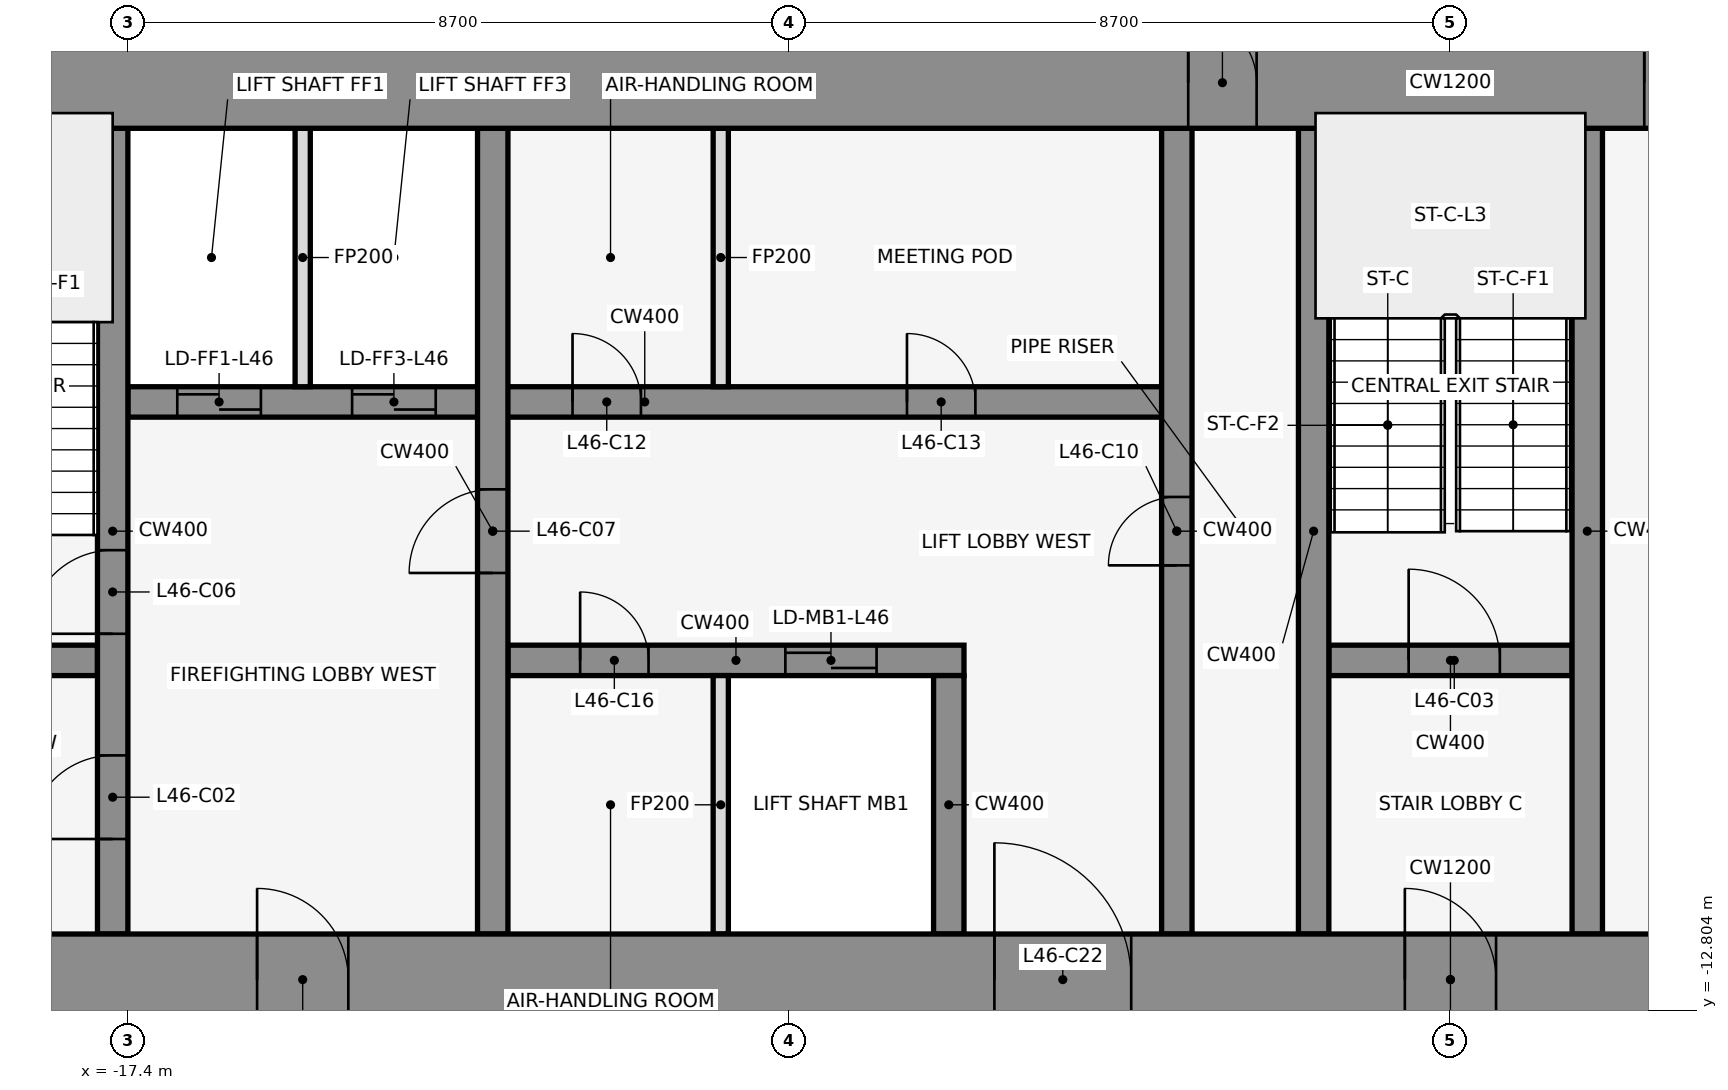
"""IFC4 building model, lengths in metres.
Left out: names, types, materials, properties, quantities, classifications, styles, units other than length and angle.
Written with IfcOpenShell. Run it as: python <this file> out.ifc"""

import sys

from ifc_helpers import new_model, si_unit, direction, frame, frame_2d, origin, place, context, subcontext, project, spatial, rectangle, extrude, element, fill, save


model = new_model("IFC4")
c1 = context("Model", 3, precision=1e-05, world=origin(), true_north=direction((0.0, 1.0)))
c2 = subcontext(c1, "Body", "Model", "MODEL_VIEW")
j1 = project(units=[si_unit("LENGTHUNIT", "METRE"), si_unit("PLANEANGLEUNIT", "RADIAN")], contexts=[c1])
p1 = place(None, origin())
s1 = spatial("IfcSite", under=j1, at=p1, CompositionType="ELEMENT")
p2 = place(p1, origin())
s2 = spatial("IfcBuilding", under=s1, at=p2, CompositionType="ELEMENT")
p3 = place(p2, frame((0.0, 0.0, 207.3)))
s3 = spatial("IfcBuildingStorey", under=s2, at=p3, CompositionType="ELEMENT", Elevation=207.3)
for number, where, z_axis, x_axis in (
    (1, (1.901, 1.08, 0.0), (0.0, 0.0, 1.0), (-0.84, -0.543, 0.0)),
    (2, (-0.068, -0.105, 0.0), (0.0, 0.0, 1.0), (-0.84, 0.543, 0.0)),
    (3, (-14.599, 1.08, 0.0), (0.0, 0.0, 1.0), (-0.84, -0.543, 0.0)),
):
    element("IfcWall", number, at=place(p3, frame(where, z_axis=z_axis, x_axis=x_axis)), inside=s3, PredefinedType="STANDARD", context=c2, shape_type="SweptSolid", body=[
        extrude(rectangle(XDim=2.183, YDim=0.25, at=frame_2d((1.091, 0.0))), origin(), (0.0, 0.0, 1.0), 3.95),
    ])
p4 = place(p3, frame((-20.8, -8.2, 0.0), z_axis=(0.0, 0.0, 1.0), x_axis=(1.0, 0.0, 0.0)))
e4 = element("IfcWall", 4, at=p4, inside=s3, PredefinedType="SHEAR", context=c2, shape_type="SweptSolid", body=[
    extrude(rectangle(XDim=3.0, YDim=0.4, at=frame_2d((1.5, 0.0))), origin(), (0.0, 0.0, 1.0), 4.1),
])
p5 = place(p4, frame((0.85, 0.0, 0.0)))
e5 = element("IfcOpeningElement", 5, at=p5, cuts=e4, PredefinedType="OPENING", context=c2, shape_type="SweptSolid", body=[
    extrude(rectangle(XDim=1.2, YDim=2.1, at=frame_2d((0.6, 1.05))), frame((0.0, 0.212, 0.0), z_axis=(0.0, -1.0, 0.0), x_axis=(1.0, 0.0, 0.0)), (0.0, 0.0, 1.0), 0.424),
])
p6 = place(p3, frame((-12.4, -8.2, 0.0), z_axis=(0.0, 0.0, 1.0), x_axis=(1.0, 0.0, 0.0)))
e6 = element("IfcWall", 6, at=p6, inside=s3, PredefinedType="SHEAR", context=c2, shape_type="SweptSolid", body=[
    extrude(rectangle(XDim=6.0, YDim=0.4, at=frame_2d((3.0, 0.0))), origin(), (0.0, 0.0, 1.0), 4.1),
])
p7 = place(p6, frame((3.65, 0.0, 0.0)))
e7 = element("IfcOpeningElement", 7, at=p7, cuts=e6, PredefinedType="OPENING", context=c2, shape_type="SweptSolid", body=[
    extrude(rectangle(XDim=1.2, YDim=2.1, at=frame_2d((0.6, 1.05))), frame((0.0, 0.212, 0.0), z_axis=(0.0, -1.0, 0.0), x_axis=(1.0, 0.0, 0.0)), (0.0, 0.0, 1.0), 0.424),
])
p8 = place(p6, frame((0.95, 0.0, 0.0)))
e8 = element("IfcOpeningElement", 8, at=p8, cuts=e6, PredefinedType="OPENING", context=c2, shape_type="SweptSolid", body=[
    extrude(rectangle(XDim=0.9, YDim=2.1, at=frame_2d((0.45, 1.05))), frame((0.0, 0.212, 0.0), z_axis=(0.0, -1.0, 0.0), x_axis=(1.0, 0.0, 0.0)), (0.0, 0.0, 1.0), 0.424),
])
p9 = place(p3, frame((-1.6, -8.2, 0.0), z_axis=(0.0, 0.0, 1.0), x_axis=(1.0, 0.0, 0.0)))
e9 = element("IfcWall", 9, at=p9, inside=s3, PredefinedType="SHEAR", context=c2, shape_type="SweptSolid", body=[
    extrude(rectangle(XDim=3.2, YDim=0.4, at=frame_2d((1.6, 0.0))), origin(), (0.0, 0.0, 1.0), 4.1),
])
p10 = place(p9, frame((1.05, 0.0, 0.0)))
e10 = element("IfcOpeningElement", 10, at=p10, cuts=e9, PredefinedType="OPENING", context=c2, shape_type="SweptSolid", body=[
    extrude(rectangle(XDim=1.2, YDim=2.1, at=frame_2d((0.6, 1.05))), frame((0.0, 0.212, 0.0), z_axis=(0.0, -1.0, 0.0), x_axis=(1.0, 0.0, 0.0)), (0.0, 0.0, 1.0), 0.424),
])
p11 = place(p3, frame((-17.4, -4.8, 0.0), z_axis=(0.0, 0.0, 1.0), x_axis=(1.0, 0.0, 0.0)))
e11 = element("IfcWall", 11, at=p11, inside=s3, PredefinedType="SHEAR", context=c2, shape_type="SweptSolid", body=[
    extrude(rectangle(XDim=13.6, YDim=0.4, at=frame_2d((6.8, 0.0))), origin(), (0.0, 0.0, 1.0), 4.1),
])
p12 = place(p11, frame((0.65, 0.0, 0.0)))
e12 = element("IfcOpeningElement", 12, at=p12, cuts=e11, PredefinedType="OPENING", context=c2, shape_type="SweptSolid", body=[
    extrude(rectangle(XDim=1.1, YDim=2.1, at=frame_2d((0.55, 1.05))), frame((0.0, 0.212, 0.0), z_axis=(0.0, -1.0, 0.0), x_axis=(1.0, 0.0, 0.0)), (0.0, 0.0, 1.0), 0.424),
])
p13 = place(p11, frame((2.95, 0.0, 0.0)))
e13 = element("IfcOpeningElement", 13, at=p13, cuts=e11, PredefinedType="OPENING", context=c2, shape_type="SweptSolid", body=[
    extrude(rectangle(XDim=1.1, YDim=2.1, at=frame_2d((0.55, 1.05))), frame((0.0, 0.212, 0.0), z_axis=(0.0, -1.0, 0.0), x_axis=(1.0, 0.0, 0.0)), (0.0, 0.0, 1.0), 0.424),
])
p14 = place(p11, frame((5.85, 0.0, 0.0)))
e14 = element("IfcOpeningElement", 14, at=p14, cuts=e11, PredefinedType="OPENING", context=c2, shape_type="SweptSolid", body=[
    extrude(rectangle(XDim=0.9, YDim=2.1, at=frame_2d((0.45, 1.05))), frame((0.0, 0.212, 0.0), z_axis=(0.0, -1.0, 0.0), x_axis=(1.0, 0.0, 0.0)), (0.0, 0.0, 1.0), 0.424),
])
p15 = place(p11, frame((10.25, 0.0, 0.0)))
e15 = element("IfcOpeningElement", 15, at=p15, cuts=e11, PredefinedType="OPENING", context=c2, shape_type="SweptSolid", body=[
    extrude(rectangle(XDim=0.9, YDim=2.1, at=frame_2d((0.45, 1.05))), frame((0.0, 0.212, 0.0), z_axis=(0.0, -1.0, 0.0), x_axis=(1.0, 0.0, 0.0)), (0.0, 0.0, 1.0), 0.424),
])
p16 = place(p3, frame((-17.6, -11.8, 0.0), z_axis=(0.0, 0.0, 1.0), x_axis=(0.0, 1.0, 0.0)))
e16 = element("IfcWall", 16, at=p16, inside=s3, PredefinedType="SHEAR", context=c2, shape_type="SweptSolid", body=[
    extrude(rectangle(XDim=10.6, YDim=0.4, at=frame_2d((5.3, 0.0))), origin(), (0.0, 0.0, 1.0), 4.1),
])
p17 = place(p16, frame((1.25, 0.0, 0.0)))
e17 = element("IfcOpeningElement", 17, at=p17, cuts=e16, PredefinedType="OPENING", context=c2, shape_type="SweptSolid", body=[
    extrude(rectangle(XDim=1.1, YDim=2.1, at=frame_2d((0.55, 1.05))), frame((0.0, 0.212, 0.0), z_axis=(0.0, -1.0, 0.0), x_axis=(1.0, 0.0, 0.0)), (0.0, 0.0, 1.0), 0.424),
])
p18 = place(p16, frame((3.95, 0.0, 0.0)))
e18 = element("IfcOpeningElement", 18, at=p18, cuts=e16, PredefinedType="OPENING", context=c2, shape_type="SweptSolid", body=[
    extrude(rectangle(XDim=1.1, YDim=2.1, at=frame_2d((0.55, 1.05))), frame((0.0, 0.212, 0.0), z_axis=(0.0, -1.0, 0.0), x_axis=(1.0, 0.0, 0.0)), (0.0, 0.0, 1.0), 0.424),
])
p19 = place(p3, frame((-15.1, -4.6, 0.0), z_axis=(0.0, 0.0, 1.0), x_axis=(0.0, 1.0, 0.0)))
e19 = element("IfcWall", 19, at=p19, inside=s3, PredefinedType="PARTITIONING", context=c2, shape_type="SweptSolid", body=[
    extrude(rectangle(XDim=3.4, YDim=0.2, at=frame_2d((1.7, 0.0))), origin(), (0.0, 0.0, 1.0), 2.84),
])
p20 = place(p3, frame((-12.6, -11.8, 0.0), z_axis=(0.0, 0.0, 1.0), x_axis=(0.0, 1.0, 0.0)))
e20 = element("IfcWall", 20, at=p20, inside=s3, PredefinedType="SHEAR", context=c2, shape_type="SweptSolid", body=[
    extrude(rectangle(XDim=10.6, YDim=0.4, at=frame_2d((5.3, 0.0))), origin(), (0.0, 0.0, 1.0), 4.1),
])
p21 = place(p20, frame((4.75, 0.0, 0.0)))
e21 = element("IfcOpeningElement", 21, at=p21, cuts=e20, PredefinedType="OPENING", context=c2, shape_type="SweptSolid", body=[
    extrude(rectangle(XDim=1.1, YDim=2.1, at=frame_2d((0.55, 1.05))), frame((0.0, 0.212, 0.0), z_axis=(0.0, -1.0, 0.0), x_axis=(1.0, 0.0, 0.0)), (0.0, 0.0, 1.0), 0.424),
])
for number, where, z_axis, x_axis in (
    (22, (-9.6, -11.8, 0.0), (0.0, 0.0, 1.0), (0.0, 1.0, 0.0)),
    (23, (-9.6, -4.6, 0.0), (0.0, 0.0, 1.0), (0.0, 1.0, 0.0)),
):
    element("IfcWall", number, at=place(p3, frame(where, z_axis=z_axis, x_axis=x_axis)), inside=s3, PredefinedType="PARTITIONING", context=c2, shape_type="SweptSolid", body=[
        extrude(rectangle(XDim=3.4, YDim=0.2, at=frame_2d((1.7, 0.0))), origin(), (0.0, 0.0, 1.0), 2.84),
    ])
p22 = place(p3, frame((-6.6, -11.8, 0.0), z_axis=(0.0, 0.0, 1.0), x_axis=(0.0, 1.0, 0.0)))
e24 = element("IfcWall", 24, at=p22, inside=s3, PredefinedType="SHEAR", context=c2, shape_type="SweptSolid", body=[
    extrude(rectangle(XDim=3.4, YDim=0.4, at=frame_2d((1.7, 0.0))), origin(), (0.0, 0.0, 1.0), 4.1),
])
p23 = place(p3, frame((-3.6, -11.8, 0.0), z_axis=(0.0, 0.0, 1.0), x_axis=(0.0, 1.0, 0.0)))
e25 = element("IfcWall", 25, at=p23, inside=s3, PredefinedType="SHEAR", context=c2, shape_type="SweptSolid", body=[
    extrude(rectangle(XDim=10.6, YDim=0.4, at=frame_2d((5.3, 0.0))), origin(), (0.0, 0.0, 1.0), 4.1),
])
p24 = place(p23, frame((4.85, 0.0, 0.0)))
e26 = element("IfcOpeningElement", 26, at=p24, cuts=e25, PredefinedType="OPENING", context=c2, shape_type="SweptSolid", body=[
    extrude(rectangle(XDim=0.9, YDim=2.1, at=frame_2d((0.45, 1.05))), frame((0.0, 0.212, 0.0), z_axis=(0.0, -1.0, 0.0), x_axis=(1.0, 0.0, 0.0)), (0.0, 0.0, 1.0), 0.424),
])
for number, where, z_axis, x_axis in (
    (27, (-1.8, -11.8, 0.0), (0.0, 0.0, 1.0), (0.0, 1.0, 0.0)),
    (28, (1.8, -11.8, 0.0), (0.0, 0.0, 1.0), (0.0, 1.0, 0.0)),
):
    element("IfcWall", number, at=place(p3, frame(where, z_axis=z_axis, x_axis=x_axis)), inside=s3, PredefinedType="SHEAR", context=c2, shape_type="SweptSolid", body=[
        extrude(rectangle(XDim=10.6, YDim=0.4, at=frame_2d((5.3, 0.0))), origin(), (0.0, 0.0, 1.0), 4.1),
    ])
p25 = place(p3, frame((-22.0, -0.6, 0.0), z_axis=(0.0, 0.0, 1.0), x_axis=(1.0, 0.0, 0.0)))
e29 = element("IfcWall", 29, at=p25, inside=s3, PredefinedType="SHEAR", context=c2, shape_type="SweptSolid", body=[
    extrude(rectangle(XDim=44.0, YDim=1.2, at=frame_2d((22.0, 0.0))), origin(), (0.0, 0.0, 1.0), 4.1),
])
p26 = place(p25, frame((18.55, 0.0, 0.0)))
e30 = element("IfcOpeningElement", 30, at=p26, cuts=e29, PredefinedType="OPENING", context=c2, shape_type="SweptSolid", body=[
    extrude(rectangle(XDim=0.9, YDim=2.1, at=frame_2d((0.45, 1.05))), frame((0.0, 0.612, 0.0), z_axis=(0.0, -1.0, 0.0), x_axis=(1.0, 0.0, 0.0)), (0.0, 0.0, 1.0), 1.224),
])
p27 = place(p25, frame((24.55, 0.0, 0.0)))
e31 = element("IfcOpeningElement", 31, at=p27, cuts=e29, PredefinedType="OPENING", context=c2, shape_type="SweptSolid", body=[
    extrude(rectangle(XDim=0.9, YDim=2.1, at=frame_2d((0.45, 1.05))), frame((0.0, 0.612, 0.0), z_axis=(0.0, -1.0, 0.0), x_axis=(1.0, 0.0, 0.0)), (0.0, 0.0, 1.0), 1.224),
])
p28 = place(p3, frame((-22.0, -12.4, 0.0), z_axis=(0.0, 0.0, 1.0), x_axis=(1.0, 0.0, 0.0)))
e32 = element("IfcWall", 32, at=p28, inside=s3, PredefinedType="SHEAR", context=c2, shape_type="SweptSolid", body=[
    extrude(rectangle(XDim=44.0, YDim=1.2, at=frame_2d((22.0, 0.0))), origin(), (0.0, 0.0, 1.0), 4.1),
])
p29 = place(p28, frame((2.2, 0.0, 0.0)))
e33 = element("IfcOpeningElement", 33, at=p29, cuts=e32, PredefinedType="OPENING", context=c2, shape_type="SweptSolid", body=[
    extrude(rectangle(XDim=1.2, YDim=2.1, at=frame_2d((0.6, 1.05))), frame((0.0, 0.612, 0.0), z_axis=(0.0, -1.0, 0.0), x_axis=(1.0, 0.0, 0.0)), (0.0, 0.0, 1.0), 1.224),
])
p30 = place(p28, frame((21.4, 0.0, 0.0)))
e34 = element("IfcOpeningElement", 34, at=p30, cuts=e32, PredefinedType="OPENING", context=c2, shape_type="SweptSolid", body=[
    extrude(rectangle(XDim=1.2, YDim=2.1, at=frame_2d((0.6, 1.05))), frame((0.0, 0.612, 0.0), z_axis=(0.0, -1.0, 0.0), x_axis=(1.0, 0.0, 0.0)), (0.0, 0.0, 1.0), 1.224),
])
p31 = place(p28, frame((40.6, 0.0, 0.0)))
e35 = element("IfcOpeningElement", 35, at=p31, cuts=e32, PredefinedType="OPENING", context=c2, shape_type="SweptSolid", body=[
    extrude(rectangle(XDim=1.2, YDim=2.1, at=frame_2d((0.6, 1.05))), frame((0.0, 0.612, 0.0), z_axis=(0.0, -1.0, 0.0), x_axis=(1.0, 0.0, 0.0)), (0.0, 0.0, 1.0), 1.224),
])
p32 = place(p28, frame((16.0, 0.0, 0.0)))
e36 = element("IfcOpeningElement", 36, at=p32, cuts=e32, PredefinedType="OPENING", context=c2, shape_type="SweptSolid", body=[
    extrude(rectangle(XDim=1.8, YDim=2.1, at=frame_2d((0.9, 1.05))), frame((0.0, 0.612, 0.0), z_axis=(0.0, -1.0, 0.0), x_axis=(1.0, 0.0, 0.0)), (0.0, 0.0, 1.0), 1.224),
])
p33 = place(p28, frame((6.3, 0.0, 0.0)))
e37 = element("IfcOpeningElement", 37, at=p33, cuts=e32, PredefinedType="OPENING", context=c2, shape_type="SweptSolid", body=[
    extrude(rectangle(XDim=1.2, YDim=2.1, at=frame_2d((0.6, 1.05))), frame((0.0, 0.612, 0.0), z_axis=(0.0, -1.0, 0.0), x_axis=(1.0, 0.0, 0.0)), (0.0, 0.0, 1.0), 1.224),
])
p34 = place(p28, frame((26.2, 0.0, 0.0)))
e38 = element("IfcOpeningElement", 38, at=p34, cuts=e32, PredefinedType="OPENING", context=c2, shape_type="SweptSolid", body=[
    extrude(rectangle(XDim=1.8, YDim=2.1, at=frame_2d((0.9, 1.05))), frame((0.0, 0.612, 0.0), z_axis=(0.0, -1.0, 0.0), x_axis=(1.0, 0.0, 0.0)), (0.0, 0.0, 1.0), 1.224),
])
p35 = place(p28, frame((36.5, 0.0, 0.0)))
e39 = element("IfcOpeningElement", 39, at=p35, cuts=e32, PredefinedType="OPENING", context=c2, shape_type="SweptSolid", body=[
    extrude(rectangle(XDim=1.2, YDim=2.1, at=frame_2d((0.6, 1.05))), frame((0.0, 0.612, 0.0), z_axis=(0.0, -1.0, 0.0), x_axis=(1.0, 0.0, 0.0)), (0.0, 0.0, 1.0), 1.224),
])
p36 = place(p17, frame((1.1, 0.0, 0.0), z_axis=(0.0, 0.0, 1.0), x_axis=(-1.0, 0.0, 0.0)))
e40 = element("IfcDoor", 40, at=p36, inside=s3, OperationType="SINGLE_SWING_LEFT", PredefinedType="DOOR", context=c2, shape_type="SweptSolid", body=[
    extrude(rectangle(XDim=1.1, YDim=2.1, at=frame_2d((0.55, 1.05))), frame((0.0, 0.025, 0.0), z_axis=(0.0, -1.0, 0.0), x_axis=(1.0, 0.0, 0.0)), (0.0, 0.0, 1.0), 0.05),
])
fill(e17, e40)
p37 = place(p10, origin())
e41 = element("IfcDoor", 41, at=p37, inside=s3, OperationType="SINGLE_SWING_LEFT", PredefinedType="DOOR", context=c2, shape_type="SweptSolid", body=[
    extrude(rectangle(XDim=1.2, YDim=2.1, at=frame_2d((0.6, 1.05))), frame((0.0, 0.025, 0.0), z_axis=(0.0, -1.0, 0.0), x_axis=(1.0, 0.0, 0.0)), (0.0, 0.0, 1.0), 0.05),
])
fill(e10, e41)
p38 = place(p12, origin())
e42 = element("IfcDoor", 42, at=p38, inside=s3, OperationType="DOUBLE_DOOR_SLIDING", PredefinedType="DOOR", context=c2, shape_type="SweptSolid", body=[
    extrude(rectangle(XDim=1.1, YDim=2.1, at=frame_2d((0.55, 1.05))), frame((0.0, 0.025, 0.0), z_axis=(0.0, -1.0, 0.0), x_axis=(1.0, 0.0, 0.0)), (0.0, 0.0, 1.0), 0.05),
])
fill(e12, e42)
p39 = place(p13, origin())
e43 = element("IfcDoor", 43, at=p39, inside=s3, OperationType="DOUBLE_DOOR_SLIDING", PredefinedType="DOOR", context=c2, shape_type="SweptSolid", body=[
    extrude(rectangle(XDim=1.1, YDim=2.1, at=frame_2d((0.55, 1.05))), frame((0.0, 0.025, 0.0), z_axis=(0.0, -1.0, 0.0), x_axis=(1.0, 0.0, 0.0)), (0.0, 0.0, 1.0), 0.05),
])
fill(e13, e43)
p40 = place(p7, origin())
e44 = element("IfcDoor", 44, at=p40, inside=s3, OperationType="DOUBLE_DOOR_SLIDING", PredefinedType="DOOR", context=c2, shape_type="SweptSolid", body=[
    extrude(rectangle(XDim=1.2, YDim=2.1, at=frame_2d((0.6, 1.05))), frame((0.0, 0.025, 0.0), z_axis=(0.0, -1.0, 0.0), x_axis=(1.0, 0.0, 0.0)), (0.0, 0.0, 1.0), 0.05),
])
fill(e7, e44)
p41 = place(p18, frame((1.1, 0.0, 0.0), z_axis=(0.0, 0.0, 1.0), x_axis=(-1.0, 0.0, 0.0)))
e45 = element("IfcDoor", 45, at=p41, inside=s3, OperationType="SINGLE_SWING_LEFT", PredefinedType="DOOR", context=c2, shape_type="SweptSolid", body=[
    extrude(rectangle(XDim=1.1, YDim=2.1, at=frame_2d((0.55, 1.05))), frame((0.0, 0.025, 0.0), z_axis=(0.0, -1.0, 0.0), x_axis=(1.0, 0.0, 0.0)), (0.0, 0.0, 1.0), 0.05),
])
fill(e18, e45)
p42 = place(p21, origin())
e46 = element("IfcDoor", 46, at=p42, inside=s3, OperationType="SINGLE_SWING_LEFT", PredefinedType="DOOR", context=c2, shape_type="SweptSolid", body=[
    extrude(rectangle(XDim=1.1, YDim=2.1, at=frame_2d((0.55, 1.05))), frame((0.0, 0.025, 0.0), z_axis=(0.0, -1.0, 0.0), x_axis=(1.0, 0.0, 0.0)), (0.0, 0.0, 1.0), 0.05),
])
fill(e21, e46)
p43 = place(p24, frame((0.9, 0.0, 0.0), z_axis=(0.0, 0.0, 1.0), x_axis=(-1.0, 0.0, 0.0)))
e47 = element("IfcDoor", 47, at=p43, inside=s3, OperationType="SINGLE_SWING_LEFT", PredefinedType="DOOR", context=c2, shape_type="SweptSolid", body=[
    extrude(rectangle(XDim=0.9, YDim=2.1, at=frame_2d((0.45, 1.05))), frame((0.0, 0.025, 0.0), z_axis=(0.0, -1.0, 0.0), x_axis=(1.0, 0.0, 0.0)), (0.0, 0.0, 1.0), 0.05),
])
fill(e26, e47)
p44 = place(p14, origin())
e48 = element("IfcDoor", 48, at=p44, inside=s3, OperationType="SINGLE_SWING_RIGHT", PredefinedType="DOOR", context=c2, shape_type="SweptSolid", body=[
    extrude(rectangle(XDim=0.9, YDim=2.1, at=frame_2d((0.45, 1.05))), frame((0.0, 0.025, 0.0), z_axis=(0.0, -1.0, 0.0), x_axis=(1.0, 0.0, 0.0)), (0.0, 0.0, 1.0), 0.05),
])
fill(e14, e48)
p45 = place(p15, origin())
e49 = element("IfcDoor", 49, at=p45, inside=s3, OperationType="SINGLE_SWING_LEFT", PredefinedType="DOOR", context=c2, shape_type="SweptSolid", body=[
    extrude(rectangle(XDim=0.9, YDim=2.1, at=frame_2d((0.45, 1.05))), frame((0.0, 0.025, 0.0), z_axis=(0.0, -1.0, 0.0), x_axis=(1.0, 0.0, 0.0)), (0.0, 0.0, 1.0), 0.05),
])
fill(e15, e49)
p46 = place(p8, frame((0.9, 0.0, 0.0), z_axis=(0.0, 0.0, 1.0), x_axis=(-1.0, 0.0, 0.0)))
e50 = element("IfcDoor", 50, at=p46, inside=s3, OperationType="SINGLE_SWING_LEFT", PredefinedType="DOOR", context=c2, shape_type="SweptSolid", body=[
    extrude(rectangle(XDim=0.9, YDim=2.1, at=frame_2d((0.45, 1.05))), frame((0.0, 0.025, 0.0), z_axis=(0.0, -1.0, 0.0), x_axis=(1.0, 0.0, 0.0)), (0.0, 0.0, 1.0), 0.05),
])
fill(e8, e50)
p47 = place(p26, origin())
e51 = element("IfcDoor", 51, at=p47, inside=s3, OperationType="SINGLE_SWING_LEFT", PredefinedType="DOOR", context=c2, shape_type="SweptSolid", body=[
    extrude(rectangle(XDim=0.9, YDim=2.1, at=frame_2d((0.45, 1.05))), frame((0.0, 0.025, 0.0), z_axis=(0.0, -1.0, 0.0), x_axis=(1.0, 0.0, 0.0)), (0.0, 0.0, 1.0), 0.05),
])
fill(e30, e51)
p48 = place(p27, origin())
e52 = element("IfcDoor", 52, at=p48, inside=s3, OperationType="SINGLE_SWING_LEFT", PredefinedType="DOOR", context=c2, shape_type="SweptSolid", body=[
    extrude(rectangle(XDim=0.9, YDim=2.1, at=frame_2d((0.45, 1.05))), frame((0.0, 0.025, 0.0), z_axis=(0.0, -1.0, 0.0), x_axis=(1.0, 0.0, 0.0)), (0.0, 0.0, 1.0), 0.05),
])
fill(e31, e52)
p49 = place(p30, frame((1.2, 0.0, 0.0), z_axis=(0.0, 0.0, 1.0), x_axis=(-1.0, 0.0, 0.0)))
e53 = element("IfcDoor", 53, at=p49, inside=s3, OperationType="SINGLE_SWING_RIGHT", PredefinedType="DOOR", context=c2, shape_type="SweptSolid", body=[
    extrude(rectangle(XDim=1.2, YDim=2.1, at=frame_2d((0.6, 1.05))), frame((0.0, 0.025, 0.0), z_axis=(0.0, -1.0, 0.0), x_axis=(1.0, 0.0, 0.0)), (0.0, 0.0, 1.0), 0.05),
])
fill(e34, e53)
p50 = place(p32, origin())
e54 = element("IfcDoor", 54, at=p50, inside=s3, OperationType="SINGLE_SWING_LEFT", PredefinedType="DOOR", context=c2, shape_type="SweptSolid", body=[
    extrude(rectangle(XDim=1.8, YDim=2.1, at=frame_2d((0.9, 1.05))), frame((0.0, 0.025, 0.0), z_axis=(0.0, -1.0, 0.0), x_axis=(1.0, 0.0, 0.0)), (0.0, 0.0, 1.0), 0.05),
])
fill(e36, e54)
p51 = place(p33, frame((1.2, 0.0, 0.0), z_axis=(0.0, 0.0, 1.0), x_axis=(-1.0, 0.0, 0.0)))
e55 = element("IfcDoor", 55, at=p51, inside=s3, OperationType="SINGLE_SWING_RIGHT", PredefinedType="DOOR", context=c2, shape_type="SweptSolid", body=[
    extrude(rectangle(XDim=1.2, YDim=2.1, at=frame_2d((0.6, 1.05))), frame((0.0, 0.025, 0.0), z_axis=(0.0, -1.0, 0.0), x_axis=(1.0, 0.0, 0.0)), (0.0, 0.0, 1.0), 0.05),
])
fill(e37, e55)
save(model, sys.argv[1])
